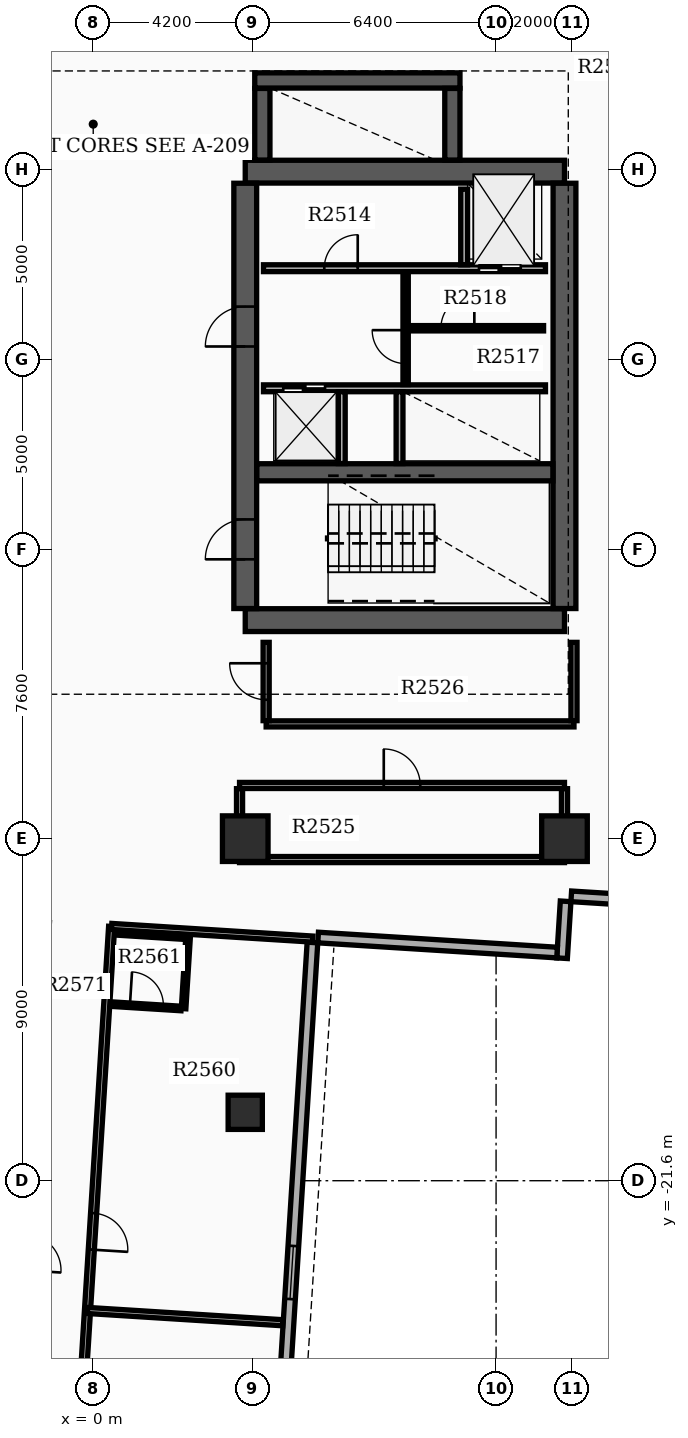
"""IFC4 building model, lengths in metres.
Left out: names, types, materials, properties, quantities, classifications, styles, units other than length and angle.
Written with IfcOpenShell. Run it as: python <this file> out.ifc"""

import sys

from ifc_helpers import new_model, si_unit, direction, frame, frame_2d, origin, origin_2d, place, context, subcontext, project, spatial, rectangle, extrude, element, fill, save


model = new_model("IFC4")
c1 = context("Model", 3, precision=1e-05, world=origin(), true_north=direction((0.0, 1.0)))
c2 = subcontext(c1, "Body", "Model", "MODEL_VIEW")
j1 = project(units=[si_unit("LENGTHUNIT", "METRE"), si_unit("PLANEANGLEUNIT", "RADIAN")], contexts=[c1])
p1 = place(None, origin())
s1 = spatial("IfcSite", under=j1, at=p1, CompositionType="ELEMENT")
p2 = place(p1, origin())
s2 = spatial("IfcBuilding", under=s1, at=p2, CompositionType="ELEMENT")
p3 = place(p2, frame((0.0, 0.0, 160.5)))
s3 = spatial("IfcBuildingStorey", under=s2, at=p3, CompositionType="ELEMENT", Elevation=160.5)
for number, where, z_axis, x_axis in (
    (1, (4.0, -6.85, 0.0), (0.0, 0.0, 1.0), (1.0, 0.0, 0.0)),
    (2, (4.0, 4.95, 0.0), (0.0, 0.0, 1.0), (1.0, 0.0, 0.0)),
):
    element("IfcWall", number, at=place(p3, frame(where, z_axis=z_axis, x_axis=x_axis)), inside=s3, PredefinedType="SHEAR", context=c2, shape_type="SweptSolid", body=[
        extrude(rectangle(XDim=8.4, YDim=0.6, at=frame_2d((4.2, 0.0))), origin(), (0.0, 0.0, 1.0), 3.7),
    ])
p4 = place(p3, frame((4.0, -6.545, 0.0), z_axis=(0.0, 0.0, 1.0), x_axis=(0.0, 1.0, 0.0)))
e3 = element("IfcWall", 3, at=p4, inside=s3, PredefinedType="SHEAR", context=c2, shape_type="SweptSolid", body=[
    extrude(rectangle(XDim=11.19, YDim=0.6, at=frame_2d((5.595, 0.0))), origin(), (0.0, 0.0, 1.0), 3.7),
])
p5 = place(p4, frame((1.295, 0.0, 0.0)))
e4 = element("IfcOpeningElement", 4, at=p5, cuts=e3, PredefinedType="OPENING", context=c2, shape_type="SweptSolid", body=[
    extrude(rectangle(XDim=1.05, YDim=2.15, at=frame_2d((0.525, 1.075))), frame((0.0, 0.31, 0.0), z_axis=(0.0, -1.0, 0.0), x_axis=(1.0, 0.0, 0.0)), (0.0, 0.0, 1.0), 0.62),
])
p6 = place(p4, frame((6.895, 0.0, 0.0)))
e5 = element("IfcOpeningElement", 5, at=p6, cuts=e3, PredefinedType="OPENING", context=c2, shape_type="SweptSolid", body=[
    extrude(rectangle(XDim=1.05, YDim=2.15, at=frame_2d((0.525, 1.075))), frame((0.0, 0.31, 0.0), z_axis=(0.0, -1.0, 0.0), x_axis=(1.0, 0.0, 0.0)), (0.0, 0.0, 1.0), 0.62),
])
p7 = place(p3, frame((12.4, -6.545, 0.0), z_axis=(0.0, 0.0, 1.0), x_axis=(0.0, 1.0, 0.0)))
e6 = element("IfcWall", 6, at=p7, inside=s3, PredefinedType="SHEAR", context=c2, shape_type="SweptSolid", body=[
    extrude(rectangle(XDim=11.19, YDim=0.6, at=frame_2d((5.595, 0.0))), origin(), (0.0, 0.0, 1.0), 3.7),
])
p8 = place(p3, frame((4.305, -2.96, 0.0), z_axis=(0.0, 0.0, 1.0), x_axis=(1.0, 0.0, 0.0)))
e7 = element("IfcWall", 7, at=p8, inside=s3, PredefinedType="SHEAR", context=c2, shape_type="SweptSolid", body=[
    extrude(rectangle(XDim=7.79, YDim=0.45, at=frame_2d((3.895, 0.0))), origin(), (0.0, 0.0, 1.0), 3.7),
])
p9 = place(p3, frame((4.45, 5.255, 0.0), z_axis=(0.0, 0.0, 1.0), x_axis=(0.0, 1.0, 0.0)))
e8 = element("IfcWall", 8, at=p9, inside=s3, PredefinedType="SHEAR", context=c2, shape_type="SweptSolid", body=[
    extrude(rectangle(XDim=1.885, YDim=0.4, at=frame_2d((0.942, 0.0))), origin(), (0.0, 0.0, 1.0), 3.7),
])
p10 = place(p3, frame((4.25, 7.35, 0.0), z_axis=(0.0, 0.0, 1.0), x_axis=(1.0, 0.0, 0.0)))
e9 = element("IfcWall", 9, at=p10, inside=s3, PredefinedType="SHEAR", context=c2, shape_type="SweptSolid", body=[
    extrude(rectangle(XDim=5.4, YDim=0.4, at=frame_2d((2.7, 0.0))), origin(), (0.0, 0.0, 1.0), 3.7),
])
p11 = place(p3, frame((9.45, 5.255, 0.0), z_axis=(0.0, 0.0, 1.0), x_axis=(0.0, 1.0, 0.0)))
e10 = element("IfcWall", 10, at=p11, inside=s3, PredefinedType="SHEAR", context=c2, shape_type="SweptSolid", body=[
    extrude(rectangle(XDim=1.885, YDim=0.4, at=frame_2d((0.942, 0.0))), origin(), (0.0, 0.0, 1.0), 3.7),
])
for number, where, z_axis, x_axis in (
    (11, (12.4, -12.6, 0.0), (0.0, 0.0, 1.0), (1.0, 0.0, 0.0)),
    (12, (4.0, -12.6, 0.0), (0.0, 0.0, 1.0), (1.0, 0.0, 0.0)),
):
    element("IfcColumn", number, at=place(p3, frame(where, z_axis=z_axis, x_axis=x_axis)), inside=s3, PredefinedType="COLUMN", context=c2, shape_type="SweptSolid", body=[
        extrude(rectangle(XDim=1.2, YDim=1.2, at=origin_2d()), origin(), (0.0, 0.0, 1.0), 3.9),
    ])
p12 = place(p3, frame((4.0, -19.8, 0.0), z_axis=(0.0, 0.0, 1.0), x_axis=(1.0, 0.0, 0.0)))
e13 = element("IfcColumn", 13, at=p12, inside=s3, PredefinedType="COLUMN", context=c2, shape_type="SweptSolid", body=[
    extrude(rectangle(XDim=0.9, YDim=0.9, at=origin_2d()), origin(), (0.0, 0.0, 1.0), 3.9),
])
p13 = place(p3, frame((4.507, -35.393, 0.0), z_axis=(0.0, 0.0, 1.0), x_axis=(0.062784355807, 0.998027116198, 0.0)))
e14 = element("IfcWall", 14, at=p13, inside=s3, PredefinedType="STANDARD", context=c2, shape_type="SweptSolid", body=[
    extrude(rectangle(XDim=20.1, YDim=0.28, at=frame_2d((10.05, 0.0))), origin(), (0.0, 0.0, 1.0), 2.97),
])
p14 = place(p13, frame((0.85, 0.0, 0.8)))
e15 = element("IfcOpeningElement", 15, at=p14, cuts=e14, PredefinedType="OPENING", context=c2, shape_type="SweptSolid", body=[
    extrude(rectangle(XDim=1.4, YDim=1.6, at=frame_2d((0.7, 0.8))), frame((0.0, 0.15, 0.0), z_axis=(0.0, -1.0, 0.0), x_axis=(1.0, 0.0, 0.0)), (0.0, 0.0, 1.0), 0.3),
])
p15 = place(p13, frame((4.05, 0.0, 0.8)))
e16 = element("IfcOpeningElement", 16, at=p15, cuts=e14, PredefinedType="OPENING", context=c2, shape_type="SweptSolid", body=[
    extrude(rectangle(XDim=1.4, YDim=1.6, at=frame_2d((0.7, 0.8))), frame((0.0, 0.15, 0.0), z_axis=(0.0, -1.0, 0.0), x_axis=(1.0, 0.0, 0.0)), (0.0, 0.0, 1.0), 0.3),
])
p16 = place(p13, frame((7.25, 0.0, 0.8)))
e17 = element("IfcOpeningElement", 17, at=p16, cuts=e14, PredefinedType="OPENING", context=c2, shape_type="SweptSolid", body=[
    extrude(rectangle(XDim=1.4, YDim=1.6, at=frame_2d((0.7, 0.8))), frame((0.0, 0.15, 0.0), z_axis=(0.0, -1.0, 0.0), x_axis=(1.0, 0.0, 0.0)), (0.0, 0.0, 1.0), 0.3),
])
p17 = place(p13, frame((10.7, 0.0, 0.8)))
e18 = element("IfcOpeningElement", 18, at=p17, cuts=e14, PredefinedType="OPENING", context=c2, shape_type="SweptSolid", body=[
    extrude(rectangle(XDim=1.4, YDim=1.6, at=frame_2d((0.7, 0.8))), frame((0.0, 0.15, 0.0), z_axis=(0.0, -1.0, 0.0), x_axis=(1.0, 0.0, 0.0)), (0.0, 0.0, 1.0), 0.3),
])
p18 = place(p3, frame((13.796, -14.194, 0.0), z_axis=(0.0, 0.0, 1.0), x_axis=(-0.998023660242, 0.06283926796, 0.0)))
e19 = element("IfcWall", 19, at=p18, inside=s3, PredefinedType="STANDARD", context=c2, shape_type="SweptSolid", body=[
    extrude(rectangle(XDim=1.22, YDim=0.28, at=frame_2d((0.61, 0.0))), origin(), (0.0, 0.0, 1.0), 2.97),
])
p19 = place(p3, frame((12.43, -14.249, 0.0), z_axis=(0.0, 0.0, 1.0), x_axis=(-0.062824119533, -0.998024613927, 0.0)))
e20 = element("IfcWall", 20, at=p19, inside=s3, PredefinedType="STANDARD", context=c2, shape_type="SweptSolid", body=[
    extrude(rectangle(XDim=1.5, YDim=0.28, at=frame_2d((0.75, 0.0))), origin(), (0.0, 0.0, 1.0), 2.97),
])
p20 = place(p3, frame((12.205, -15.597, 0.0), z_axis=(0.0, 0.0, 1.0), x_axis=(-0.998024885752, 0.062819801181, 0.0)))
e21 = element("IfcWall", 21, at=p20, inside=s3, PredefinedType="STANDARD", context=c2, shape_type="SweptSolid", body=[
    extrude(rectangle(XDim=6.3, YDim=0.28, at=frame_2d((3.15, 0.0))), origin(), (0.0, 0.0, 1.0), 2.97),
])
p21 = place(p3, frame((4.48, 2.41, 0.0), z_axis=(0.0, 0.0, 1.0), x_axis=(1.0, 0.0, 0.0)))
e22 = element("IfcWall", 22, at=p21, inside=s3, PredefinedType="SOLIDWALL", context=c2, shape_type="SweptSolid", body=[
    extrude(rectangle(XDim=7.42, YDim=0.18, at=frame_2d((3.71, 0.0))), origin(), (0.0, 0.0, 1.0), 2.96),
])
p22 = place(p21, frame((5.67, 0.0, 0.0)))
e23 = element("IfcOpeningElement", 23, at=p22, cuts=e22, PredefinedType="OPENING", context=c2, shape_type="SweptSolid", body=[
    extrude(rectangle(XDim=1.1, YDim=2.15, at=frame_2d((0.55, 1.075))), frame((0.0, 0.1, 0.0), z_axis=(0.0, -1.0, 0.0), x_axis=(1.0, 0.0, 0.0)), (0.0, 0.0, 1.0), 0.2),
])
p23 = place(p21, frame((1.6, 0.0, 0.0)))
e24 = element("IfcOpeningElement", 24, at=p23, cuts=e22, PredefinedType="OPENING", context=c2, shape_type="SweptSolid", body=[
    extrude(rectangle(XDim=0.88, YDim=2.1, at=frame_2d((0.44, 1.05))), frame((0.0, 0.1, 0.0), z_axis=(0.0, -1.0, 0.0), x_axis=(1.0, 0.0, 0.0)), (0.0, 0.0, 1.0), 0.2),
])
p24 = place(p3, frame((4.48, -0.75, 0.0), z_axis=(0.0, 0.0, 1.0), x_axis=(1.0, 0.0, 0.0)))
e25 = element("IfcWall", 25, at=p24, inside=s3, PredefinedType="SOLIDWALL", context=c2, shape_type="SweptSolid", body=[
    extrude(rectangle(XDim=7.42, YDim=0.18, at=frame_2d((3.71, 0.0))), origin(), (0.0, 0.0, 1.0), 2.96),
])
p25 = place(p24, frame((0.52, 0.0, 0.0)))
e26 = element("IfcOpeningElement", 26, at=p25, cuts=e25, PredefinedType="OPENING", context=c2, shape_type="SweptSolid", body=[
    extrude(rectangle(XDim=1.1, YDim=2.15, at=frame_2d((0.55, 1.075))), frame((0.0, 0.1, 0.0), z_axis=(0.0, -1.0, 0.0), x_axis=(1.0, 0.0, 0.0)), (0.0, 0.0, 1.0), 0.2),
])
p26 = place(p3, frame((9.76, 2.5, 0.0), z_axis=(0.0, 0.0, 1.0), x_axis=(0.0, 1.0, 0.0)))
e27 = element("IfcWall", 27, at=p26, inside=s3, PredefinedType="SOLIDWALL", context=c2, shape_type="SweptSolid", body=[
    extrude(rectangle(XDim=1.99, YDim=0.18, at=frame_2d((0.995, 0.0))), origin(), (0.0, 0.0, 1.0), 2.96),
])
for number, where, z_axis, x_axis in (
    (28, (6.54, -2.73, 0.0), (0.0, 0.0, 1.0), (0.0, 1.0, 0.0)),
    (29, (8.06, -2.73, 0.0), (0.0, 0.0, 1.0), (0.0, 1.0, 0.0)),
):
    element("IfcWall", number, at=place(p3, frame(where, z_axis=z_axis, x_axis=x_axis)), inside=s3, PredefinedType="SOLIDWALL", context=c2, shape_type="SweptSolid", body=[
        extrude(rectangle(XDim=1.89, YDim=0.18, at=frame_2d((0.945, 0.0))), origin(), (0.0, 0.0, 1.0), 2.96),
    ])
p27 = place(p3, frame((8.22, -0.65, 0.0), z_axis=(0.0, 0.0, 1.0), x_axis=(0.0, 1.0, 0.0)))
e30 = element("IfcWall", 30, at=p27, inside=s3, PredefinedType="SOLIDWALL", context=c2, shape_type="SweptSolid", body=[
    extrude(rectangle(XDim=2.96, YDim=0.14, at=frame_2d((1.48, 0.0))), origin(), (0.0, 0.0, 1.0), 2.96),
])
p28 = place(p27, frame((0.55, 0.0, 0.0)))
e31 = element("IfcOpeningElement", 31, at=p28, cuts=e30, PredefinedType="OPENING", context=c2, shape_type="SweptSolid", body=[
    extrude(rectangle(XDim=0.88, YDim=2.1, at=frame_2d((0.44, 1.05))), frame((0.0, 0.08, 0.0), z_axis=(0.0, -1.0, 0.0), x_axis=(1.0, 0.0, 0.0)), (0.0, 0.0, 1.0), 0.16),
])
p29 = place(p3, frame((8.298, 0.83, 0.0), z_axis=(0.0, 0.0, 1.0), x_axis=(1.0, 0.0, 0.0)))
e32 = element("IfcWall", 32, at=p29, inside=s3, PredefinedType="PARTITIONING", context=c2, shape_type="SweptSolid", body=[
    extrude(rectangle(XDim=3.552, YDim=0.14, at=frame_2d((1.776, 0.0))), origin(), (0.0, 0.0, 1.0), 2.96),
])
p30 = place(p29, frame((0.85, 0.0, 0.0)))
e33 = element("IfcOpeningElement", 33, at=p30, cuts=e32, PredefinedType="OPENING", context=c2, shape_type="SweptSolid", body=[
    extrude(rectangle(XDim=0.88, YDim=2.1, at=frame_2d((0.44, 1.05))), frame((0.0, 0.08, 0.0), z_axis=(0.0, -1.0, 0.0), x_axis=(1.0, 0.0, 0.0)), (0.0, 0.0, 1.0), 0.16),
])
p31 = place(p3, frame((3.85, -13.15, 0.0), z_axis=(0.0, 0.0, 1.0), x_axis=(1.0, 0.0, 0.0)))
e34 = element("IfcWall", 34, at=p31, inside=s3, PredefinedType="PARTITIONING", context=c2, shape_type="SweptSolid", body=[
    extrude(rectangle(XDim=8.55, YDim=0.16, at=frame_2d((4.275, 0.0))), origin(), (0.0, 0.0, 1.0), 2.96),
])
p32 = place(p3, frame((3.85, -11.2, 0.0), z_axis=(0.0, 0.0, 1.0), x_axis=(1.0, 0.0, 0.0)))
e35 = element("IfcWall", 35, at=p32, inside=s3, PredefinedType="PARTITIONING", context=c2, shape_type="SweptSolid", body=[
    extrude(rectangle(XDim=8.55, YDim=0.16, at=frame_2d((4.275, 0.0))), origin(), (0.0, 0.0, 1.0), 2.96),
])
p33 = place(p32, frame((3.795, 0.0, 0.0)))
e36 = element("IfcOpeningElement", 36, at=p33, cuts=e35, PredefinedType="OPENING", context=c2, shape_type="SweptSolid", body=[
    extrude(rectangle(XDim=0.96, YDim=2.15, at=frame_2d((0.48, 1.075))), frame((0.0, 0.09, 0.0), z_axis=(0.0, -1.0, 0.0), x_axis=(1.0, 0.0, 0.0)), (0.0, 0.0, 1.0), 0.18),
])
for number, where, z_axis, x_axis in (
    (37, (3.85, -13.065, 0.0), (0.0, 0.0, 1.0), (0.0, 1.0, 0.0)),
    (38, (12.4, -13.065, 0.0), (0.0, 0.0, 1.0), (0.0, 1.0, 0.0)),
):
    element("IfcWall", number, at=place(p3, frame(where, z_axis=z_axis, x_axis=x_axis)), inside=s3, PredefinedType="PARTITIONING", context=c2, shape_type="SweptSolid", body=[
        extrude(rectangle(XDim=1.78, YDim=0.16, at=frame_2d((0.89, 0.0))), origin(), (0.0, 0.0, 1.0), 2.96),
    ])
p34 = place(p3, frame((4.55, -9.58, 0.0), z_axis=(0.0, 0.0, 1.0), x_axis=(1.0, 0.0, 0.0)))
e39 = element("IfcWall", 39, at=p34, inside=s3, PredefinedType="PARTITIONING", context=c2, shape_type="SweptSolid", body=[
    extrude(rectangle(XDim=8.1, YDim=0.16, at=frame_2d((4.05, 0.0))), origin(), (0.0, 0.0, 1.0), 2.96),
])
p35 = place(p3, frame((4.55, -9.495, 0.0), z_axis=(0.0, 0.0, 1.0), x_axis=(0.0, 1.0, 0.0)))
e40 = element("IfcWall", 40, at=p35, inside=s3, PredefinedType="PARTITIONING", context=c2, shape_type="SweptSolid", body=[
    extrude(rectangle(XDim=2.06, YDim=0.16, at=frame_2d((1.03, 0.0))), origin(), (0.0, 0.0, 1.0), 2.96),
])
p36 = place(p35, frame((0.55, 0.0, 0.0)))
e41 = element("IfcOpeningElement", 41, at=p36, cuts=e40, PredefinedType="OPENING", context=c2, shape_type="SweptSolid", body=[
    extrude(rectangle(XDim=0.96, YDim=2.15, at=frame_2d((0.48, 1.075))), frame((0.0, 0.09, 0.0), z_axis=(0.0, -1.0, 0.0), x_axis=(1.0, 0.0, 0.0)), (0.0, 0.0, 1.0), 0.18),
])
p37 = place(p3, frame((12.65, -9.495, 0.0), z_axis=(0.0, 0.0, 1.0), x_axis=(0.0, 1.0, 0.0)))
e42 = element("IfcWall", 42, at=p37, inside=s3, PredefinedType="PARTITIONING", context=c2, shape_type="SweptSolid", body=[
    extrude(rectangle(XDim=2.06, YDim=0.16, at=frame_2d((1.03, 0.0))), origin(), (0.0, 0.0, 1.0), 2.96),
])
p38 = place(p3, frame((0.485, -14.91, 0.0), z_axis=(0.0, 0.0, 1.0), x_axis=(-0.062795509413, -0.998026414479, 0.0)))
e43 = element("IfcWall", 43, at=p38, inside=s3, PredefinedType="PARTITIONING", context=c2, shape_type="SweptSolid", body=[
    extrude(rectangle(XDim=20.182, YDim=0.16, at=frame_2d((10.091, 0.0))), origin(), (0.0, 0.0, 1.0), 2.96),
])
p39 = place(p38, frame((7.559, 0.0, 0.0)))
e44 = element("IfcOpeningElement", 44, at=p39, cuts=e43, PredefinedType="OPENING", context=c2, shape_type="SweptSolid", body=[
    extrude(rectangle(XDim=0.96, YDim=2.15, at=frame_2d((0.48, 1.075))), frame((0.0, 0.09, 0.0), z_axis=(0.0, -1.0, 0.0), x_axis=(1.0, 0.0, 0.0)), (0.0, 0.0, 1.0), 0.18),
])
p40 = place(p38, frame((16.261, 0.0, 0.0)))
e45 = element("IfcOpeningElement", 45, at=p40, cuts=e43, PredefinedType="OPENING", context=c2, shape_type="SweptSolid", body=[
    extrude(rectangle(XDim=0.96, YDim=2.15, at=frame_2d((0.48, 1.075))), frame((0.0, 0.09, 0.0), z_axis=(0.0, -1.0, 0.0), x_axis=(1.0, 0.0, 0.0)), (0.0, 0.0, 1.0), 0.18),
])
p41 = place(p3, frame((0.485, -14.91, 0.0), z_axis=(0.0, 0.0, 1.0), x_axis=(0.998027043586, -0.062785510035, 0.0)))
e46 = element("IfcWall", 46, at=p41, inside=s3, PredefinedType="PARTITIONING", context=c2, shape_type="SweptSolid", body=[
    extrude(rectangle(XDim=5.3, YDim=0.16, at=frame_2d((2.65, 0.0))), origin(), (0.0, 0.0, 1.0), 2.96),
])
p42 = place(p3, frame((-0.151, -25.014, 0.0), z_axis=(0.0, 0.0, 1.0), x_axis=(0.998026864455, -0.06278835741, 0.0)))
e47 = element("IfcWall", 47, at=p42, inside=s3, PredefinedType="PARTITIONING", context=c2, shape_type="SweptSolid", body=[
    extrude(rectangle(XDim=5.152, YDim=0.16, at=frame_2d((2.576, 0.0))), origin(), (0.0, 0.0, 1.0), 2.96),
])
p43 = place(p3, frame((0.496, -16.955, 0.0), z_axis=(0.0, 0.0, 1.0), x_axis=(0.998027443946, -0.062779145668, 0.0)))
e48 = element("IfcWall", 48, at=p43, inside=s3, PredefinedType="PARTITIONING", context=c2, shape_type="SweptSolid", body=[
    extrude(rectangle(XDim=1.82, YDim=0.12, at=frame_2d((0.91, 0.0))), origin(), (0.0, 0.0, 1.0), 2.96),
])
p44 = place(p43, frame((0.47, 0.0, 0.0)))
e49 = element("IfcOpeningElement", 49, at=p44, cuts=e48, PredefinedType="OPENING", context=c2, shape_type="SweptSolid", body=[
    extrude(rectangle(XDim=0.88, YDim=2.1, at=frame_2d((0.44, 1.05))), frame((0.0, 0.07, 0.0), z_axis=(0.0, -1.0, 0.0), x_axis=(1.0, 0.0, 0.0)), (0.0, 0.0, 1.0), 0.14),
])
p45 = place(p3, frame((0.615, -15.078, 0.0), z_axis=(0.0, 0.0, 1.0), x_axis=(0.998027443946, -0.062779145668, 0.0)))
e50 = element("IfcWall", 50, at=p45, inside=s3, PredefinedType="PARTITIONING", context=c2, shape_type="SweptSolid", body=[
    extrude(rectangle(XDim=1.82, YDim=0.12, at=frame_2d((0.91, 0.0))), origin(), (0.0, 0.0, 1.0), 2.96),
])
p46 = place(p3, frame((2.496, -15.197, 0.0), z_axis=(0.0, 0.0, 1.0), x_axis=(-0.062725942896, -0.998030789148, 0.0)))
e51 = element("IfcWall", 51, at=p46, inside=s3, PredefinedType="PARTITIONING", context=c2, shape_type="SweptSolid", body=[
    extrude(rectangle(XDim=1.88, YDim=0.12, at=frame_2d((0.94, 0.0))), origin(), (0.0, 0.0, 1.0), 2.96),
])
p47 = place(p17, origin())
e52 = element("IfcWindow", 52, at=p47, inside=s3, PartitioningType="SINGLE_PANEL", PredefinedType="WINDOW", context=c2, shape_type="SweptSolid", body=[
    extrude(rectangle(XDim=1.4, YDim=1.6, at=frame_2d((0.7, 0.8))), frame((0.0, 0.03, 0.0), z_axis=(0.0, -1.0, 0.0), x_axis=(1.0, 0.0, 0.0)), (0.0, 0.0, 1.0), 0.06),
])
fill(e18, e52)
p48 = place(p5, origin())
e53 = element("IfcDoor", 53, at=p48, inside=s3, OperationType="SINGLE_SWING_LEFT", PredefinedType="DOOR", context=c2, shape_type="SweptSolid", body=[
    extrude(rectangle(XDim=1.05, YDim=2.15, at=frame_2d((0.525, 1.075))), frame((0.0, 0.025, 0.0), z_axis=(0.0, -1.0, 0.0), x_axis=(1.0, 0.0, 0.0)), (0.0, 0.0, 1.0), 0.05),
])
fill(e4, e53)
p49 = place(p6, origin())
e54 = element("IfcDoor", 54, at=p49, inside=s3, OperationType="SINGLE_SWING_LEFT", PredefinedType="DOOR", context=c2, shape_type="SweptSolid", body=[
    extrude(rectangle(XDim=1.05, YDim=2.15, at=frame_2d((0.525, 1.075))), frame((0.0, 0.025, 0.0), z_axis=(0.0, -1.0, 0.0), x_axis=(1.0, 0.0, 0.0)), (0.0, 0.0, 1.0), 0.05),
])
fill(e5, e54)
p50 = place(p22, origin())
e55 = element("IfcDoor", 55, at=p50, inside=s3, OperationType="DOUBLE_DOOR_SLIDING", PredefinedType="DOOR", context=c2, shape_type="SweptSolid", body=[
    extrude(rectangle(XDim=1.1, YDim=2.15, at=frame_2d((0.55, 1.075))), frame((0.0, 0.025, 0.0), z_axis=(0.0, -1.0, 0.0), x_axis=(1.0, 0.0, 0.0)), (0.0, 0.0, 1.0), 0.05),
])
fill(e23, e55)
p51 = place(p25, origin())
e56 = element("IfcDoor", 56, at=p51, inside=s3, OperationType="DOUBLE_DOOR_SLIDING", PredefinedType="DOOR", context=c2, shape_type="SweptSolid", body=[
    extrude(rectangle(XDim=1.1, YDim=2.15, at=frame_2d((0.55, 1.075))), frame((0.0, 0.025, 0.0), z_axis=(0.0, -1.0, 0.0), x_axis=(1.0, 0.0, 0.0)), (0.0, 0.0, 1.0), 0.05),
])
fill(e26, e56)
p52 = place(p23, origin())
e57 = element("IfcDoor", 57, at=p52, inside=s3, OperationType="SINGLE_SWING_RIGHT", PredefinedType="DOOR", context=c2, shape_type="SweptSolid", body=[
    extrude(rectangle(XDim=0.88, YDim=2.1, at=frame_2d((0.44, 1.05))), frame((0.0, 0.025, 0.0), z_axis=(0.0, -1.0, 0.0), x_axis=(1.0, 0.0, 0.0)), (0.0, 0.0, 1.0), 0.05),
])
fill(e24, e57)
p53 = place(p28, origin())
e58 = element("IfcDoor", 58, at=p53, inside=s3, OperationType="SINGLE_SWING_RIGHT", PredefinedType="DOOR", context=c2, shape_type="SweptSolid", body=[
    extrude(rectangle(XDim=0.88, YDim=2.1, at=frame_2d((0.44, 1.05))), frame((0.0, 0.025, 0.0), z_axis=(0.0, -1.0, 0.0), x_axis=(1.0, 0.0, 0.0)), (0.0, 0.0, 1.0), 0.05),
])
fill(e31, e58)
p54 = place(p30, origin())
e59 = element("IfcDoor", 59, at=p54, inside=s3, OperationType="SINGLE_SWING_RIGHT", PredefinedType="DOOR", context=c2, shape_type="SweptSolid", body=[
    extrude(rectangle(XDim=0.88, YDim=2.1, at=frame_2d((0.44, 1.05))), frame((0.0, 0.025, 0.0), z_axis=(0.0, -1.0, 0.0), x_axis=(1.0, 0.0, 0.0)), (0.0, 0.0, 1.0), 0.05),
])
fill(e33, e59)
p55 = place(p33, origin())
e60 = element("IfcDoor", 60, at=p55, inside=s3, OperationType="SINGLE_SWING_LEFT", PredefinedType="DOOR", context=c2, shape_type="SweptSolid", body=[
    extrude(rectangle(XDim=0.96, YDim=2.15, at=frame_2d((0.48, 1.075))), frame((0.0, 0.025, 0.0), z_axis=(0.0, -1.0, 0.0), x_axis=(1.0, 0.0, 0.0)), (0.0, 0.0, 1.0), 0.05),
])
fill(e36, e60)
p56 = place(p36, origin())
e61 = element("IfcDoor", 61, at=p56, inside=s3, OperationType="SINGLE_SWING_RIGHT", PredefinedType="DOOR", context=c2, shape_type="SweptSolid", body=[
    extrude(rectangle(XDim=0.96, YDim=2.15, at=frame_2d((0.48, 1.075))), frame((0.0, 0.025, 0.0), z_axis=(0.0, -1.0, 0.0), x_axis=(1.0, 0.0, 0.0)), (0.0, 0.0, 1.0), 0.05),
])
fill(e41, e61)
p57 = place(p39, origin())
e62 = element("IfcDoor", 62, at=p57, inside=s3, OperationType="SINGLE_SWING_RIGHT", PredefinedType="DOOR", context=c2, shape_type="SweptSolid", body=[
    extrude(rectangle(XDim=0.96, YDim=2.15, at=frame_2d((0.48, 1.075))), frame((0.0, 0.025, 0.0), z_axis=(0.0, -1.0, 0.0), x_axis=(1.0, 0.0, 0.0)), (0.0, 0.0, 1.0), 0.05),
])
fill(e44, e62)
p58 = place(p44, origin())
e63 = element("IfcDoor", 63, at=p58, inside=s3, OperationType="SINGLE_SWING_LEFT", PredefinedType="DOOR", context=c2, shape_type="SweptSolid", body=[
    extrude(rectangle(XDim=0.88, YDim=2.1, at=frame_2d((0.44, 1.05))), frame((0.0, 0.025, 0.0), z_axis=(0.0, -1.0, 0.0), x_axis=(1.0, 0.0, 0.0)), (0.0, 0.0, 1.0), 0.05),
])
fill(e49, e63)
save(model, sys.argv[1])
